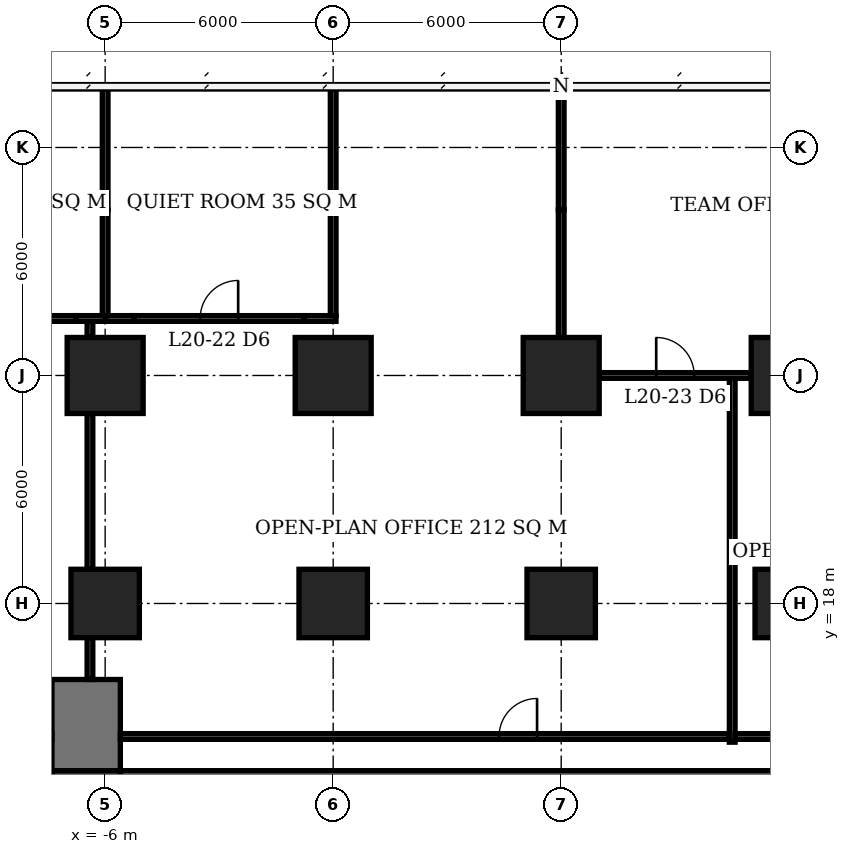
"""IFC4 building model, lengths in metres.
Left out: names, types, materials, properties, quantities, classifications, styles, units other than length and angle.
Written with IfcOpenShell. Run it as: python <this file> out.ifc"""

import sys

from ifc_helpers import new_model, si_unit, direction, frame, frame_2d, origin, origin_2d, place, context, subcontext, project, spatial, rectangle, extrude, element, fill, save


model = new_model("IFC4")
c1 = context("Model", 3, precision=1e-05, world=origin(), true_north=direction((0.0, 1.0)))
c2 = subcontext(c1, "Body", "Model", "MODEL_VIEW")
j1 = project(units=[si_unit("LENGTHUNIT", "METRE"), si_unit("PLANEANGLEUNIT", "RADIAN")], contexts=[c1])
p1 = place(None, origin())
s1 = spatial("IfcSite", under=j1, at=p1, CompositionType="ELEMENT")
p2 = place(p1, origin())
s2 = spatial("IfcBuilding", under=s1, at=p2, CompositionType="ELEMENT")
p3 = place(p2, frame((0.0, 0.0, 84.5)))
s3 = spatial("IfcBuildingStorey", under=s2, at=p3, CompositionType="ELEMENT", Elevation=84.5)
p4 = place(p3, frame((-6.0, 18.0, 0.0), z_axis=(0.0, 0.0, 1.0), x_axis=(1.0, 0.0, 0.0)))
e1 = element("IfcColumn", 1, at=p4, inside=s3, PredefinedType="COLUMN", context=c2, shape_type="SweptSolid", body=[
    extrude(rectangle(XDim=1.8, YDim=1.8, at=origin_2d()), origin(), (0.0, 0.0, 1.0), 3.9),
])
p5 = place(p3, frame((-6.0, 24.0, 0.0), z_axis=(0.0, 0.0, 1.0), x_axis=(1.0, 0.0, 0.0)))
e2 = element("IfcColumn", 2, at=p5, inside=s3, PredefinedType="COLUMN", context=c2, shape_type="SweptSolid", body=[
    extrude(rectangle(XDim=2.0, YDim=2.0, at=origin_2d()), origin(), (0.0, 0.0, 1.0), 3.9),
])
p6 = place(p3, frame((0.0, 18.0, 0.0), z_axis=(0.0, 0.0, 1.0), x_axis=(1.0, 0.0, 0.0)))
e3 = element("IfcColumn", 3, at=p6, inside=s3, PredefinedType="COLUMN", context=c2, shape_type="SweptSolid", body=[
    extrude(rectangle(XDim=1.8, YDim=1.8, at=origin_2d()), origin(), (0.0, 0.0, 1.0), 3.9),
])
p7 = place(p3, frame((0.0, 24.0, 0.0), z_axis=(0.0, 0.0, 1.0), x_axis=(1.0, 0.0, 0.0)))
e4 = element("IfcColumn", 4, at=p7, inside=s3, PredefinedType="COLUMN", context=c2, shape_type="SweptSolid", body=[
    extrude(rectangle(XDim=2.0, YDim=2.0, at=origin_2d()), origin(), (0.0, 0.0, 1.0), 3.9),
])
p8 = place(p3, frame((6.0, 18.0, 0.0), z_axis=(0.0, 0.0, 1.0), x_axis=(1.0, 0.0, 0.0)))
e5 = element("IfcColumn", 5, at=p8, inside=s3, PredefinedType="COLUMN", context=c2, shape_type="SweptSolid", body=[
    extrude(rectangle(XDim=1.8, YDim=1.8, at=origin_2d()), origin(), (0.0, 0.0, 1.0), 3.9),
])
p9 = place(p3, frame((6.0, 24.0, 0.0), z_axis=(0.0, 0.0, 1.0), x_axis=(1.0, 0.0, 0.0)))
e6 = element("IfcColumn", 6, at=p9, inside=s3, PredefinedType="COLUMN", context=c2, shape_type="SweptSolid", body=[
    extrude(rectangle(XDim=2.0, YDim=2.0, at=origin_2d()), origin(), (0.0, 0.0, 1.0), 3.9),
])
p10 = place(p3, frame((12.0, 18.0, 0.0), z_axis=(0.0, 0.0, 1.0), x_axis=(1.0, 0.0, 0.0)))
e7 = element("IfcColumn", 7, at=p10, inside=s3, PredefinedType="COLUMN", context=c2, shape_type="SweptSolid", body=[
    extrude(rectangle(XDim=1.8, YDim=1.8, at=origin_2d()), origin(), (0.0, 0.0, 1.0), 3.9),
])
p11 = place(p3, frame((12.0, 24.0, 0.0), z_axis=(0.0, 0.0, 1.0), x_axis=(1.0, 0.0, 0.0)))
e8 = element("IfcColumn", 8, at=p11, inside=s3, PredefinedType="COLUMN", context=c2, shape_type="SweptSolid", body=[
    extrude(rectangle(XDim=2.0, YDim=2.0, at=origin_2d()), origin(), (0.0, 0.0, 1.0), 3.9),
])
p12 = place(p3, frame((-5.6, 12.6, 0.0), z_axis=(0.0, 0.0, 1.0), x_axis=(1.0, 0.0, 0.0)))
e9 = element("IfcWall", 9, at=p12, inside=s3, PredefinedType="SHEAR", context=c2, shape_type="SweptSolid", body=[
    extrude(rectangle(XDim=23.2, YDim=2.0, at=frame_2d((11.6, 0.0))), origin(), (0.0, 0.0, 1.0), 3.9),
])
p13 = place(p3, frame((-6.5, -7.6, 0.0), z_axis=(0.0, 0.0, 1.0), x_axis=(0.0, 1.0, 0.0)))
e10 = element("IfcWall", 10, at=p13, inside=s3, PredefinedType="SHEAR", context=c2, shape_type="SweptSolid", body=[
    extrude(rectangle(XDim=21.2, YDim=1.8, at=frame_2d((10.6, 0.0))), origin(), (0.0, 0.0, 1.0), 3.9),
])
p14 = place(p13, frame((7.8, 0.0, 0.0)))
e11 = element("IfcOpeningElement", 11, at=p14, cuts=e10, PredefinedType="OPENING", context=c2, shape_type="SweptSolid", body=[
    extrude(rectangle(XDim=1.8, YDim=2.4, at=frame_2d((0.9, 1.2))), frame((0.0, 0.91, 0.0), z_axis=(0.0, -1.0, 0.0), x_axis=(1.0, 0.0, 0.0)), (0.0, 0.0, 1.0), 1.82),
])
p15 = place(p3, frame((-6.5, 13.6, 0.0), z_axis=(0.0, 0.0, 1.0), x_axis=(0.0, 1.0, 0.0)))
e12 = element("IfcWall", 12, at=p15, inside=s3, PredefinedType="SHEAR", context=c2, shape_type="SweptSolid", body=[
    extrude(rectangle(XDim=2.4, YDim=1.8, at=frame_2d((1.2, 0.0))), origin(), (0.0, 0.0, 1.0), 3.9),
])
p16 = place(p3, frame((7.0, 24.0, 0.0), z_axis=(0.0, 0.0, 1.0), x_axis=(1.0, 0.0, 0.0)))
e13 = element("IfcWall", 13, at=p16, inside=s3, PredefinedType="PARTITIONING", context=c2, shape_type="SweptSolid", body=[
    extrude(rectangle(XDim=4.0, YDim=0.15, at=frame_2d((2.0, 0.0))), origin(), (0.0, 0.0, 1.0), 3.65),
])
p17 = place(p16, frame((1.5, 0.0, 0.0)))
e14 = element("IfcOpeningElement", 14, at=p17, cuts=e13, PredefinedType="OPENING", context=c2, shape_type="SweptSolid", body=[
    extrude(rectangle(XDim=1.0, YDim=2.1, at=frame_2d((0.5, 1.05))), frame((0.0, 0.085, 0.0), z_axis=(0.0, -1.0, 0.0), x_axis=(1.0, 0.0, 0.0)), (0.0, 0.0, 1.0), 0.17),
])
p18 = place(p3, frame((-10.79, 25.5, 0.0), z_axis=(0.0, 0.0, 1.0), x_axis=(1.0, 0.0, 0.0)))
e15 = element("IfcWall", 15, at=p18, inside=s3, PredefinedType="PARTITIONING", context=c2, shape_type="SweptSolid", body=[
    extrude(rectangle(XDim=4.03, YDim=0.15, at=frame_2d((2.015, 0.0))), origin(), (0.0, 0.0, 1.0), 3.65),
])
p19 = place(p18, frame((1.515, 0.0, 0.0)))
e16 = element("IfcOpeningElement", 16, at=p19, cuts=e15, PredefinedType="OPENING", context=c2, shape_type="SweptSolid", body=[
    extrude(rectangle(XDim=1.0, YDim=2.1, at=frame_2d((0.5, 1.05))), frame((0.0, 0.085, 0.0), z_axis=(0.0, -1.0, 0.0), x_axis=(1.0, 0.0, 0.0)), (0.0, 0.0, 1.0), 0.17),
])
p20 = place(p3, frame((-6.76, 25.5, 0.0), z_axis=(0.0, 0.0, 1.0), x_axis=(1.0, 0.0, 0.0)))
e17 = element("IfcWall", 17, at=p20, inside=s3, PredefinedType="PARTITIONING", context=c2, shape_type="SweptSolid", body=[
    extrude(rectangle(XDim=0.835, YDim=0.15, at=frame_2d((0.417, 0.0))), origin(), (0.0, 0.0, 1.0), 2.15),
])
p21 = place(p3, frame((-6.0, 25.5, 0.0), z_axis=(0.0, 0.0, 1.0), x_axis=(1.0, 0.0, 0.0)))
e18 = element("IfcWall", 18, at=p21, inside=s3, PredefinedType="PARTITIONING", context=c2, shape_type="SweptSolid", body=[
    extrude(rectangle(XDim=0.76, YDim=0.15, at=frame_2d((0.38, 0.0))), origin(), (0.0, 0.0, 1.0), 2.15),
])
p22 = place(p3, frame((-5.24, 25.5, 0.0), z_axis=(0.0, 0.0, 1.0), x_axis=(1.0, 0.0, 0.0)))
e19 = element("IfcWall", 19, at=p22, inside=s3, PredefinedType="PARTITIONING", context=c2, shape_type="SweptSolid", body=[
    extrude(rectangle(XDim=4.48, YDim=0.15, at=frame_2d((2.24, 0.0))), origin(), (0.0, 0.0, 1.0), 3.65),
])
p23 = place(p22, frame((1.74, 0.0, 0.0)))
e20 = element("IfcOpeningElement", 20, at=p23, cuts=e19, PredefinedType="OPENING", context=c2, shape_type="SweptSolid", body=[
    extrude(rectangle(XDim=1.0, YDim=2.1, at=frame_2d((0.5, 1.05))), frame((0.0, 0.085, 0.0), z_axis=(0.0, -1.0, 0.0), x_axis=(1.0, 0.0, 0.0)), (0.0, 0.0, 1.0), 0.17),
])
p24 = place(p3, frame((-0.76, 25.5, 0.0), z_axis=(0.0, 0.0, 1.0), x_axis=(1.0, 0.0, 0.0)))
e21 = element("IfcWall", 21, at=p24, inside=s3, PredefinedType="PARTITIONING", context=c2, shape_type="SweptSolid", body=[
    extrude(rectangle(XDim=0.835, YDim=0.15, at=frame_2d((0.417, 0.0))), origin(), (0.0, 0.0, 1.0), 2.15),
])
p25 = place(p3, frame((-6.0, 25.575, 0.0), z_axis=(0.0, 0.0, 1.0), x_axis=(0.0, 1.0, 0.0)))
e22 = element("IfcWall", 22, at=p25, inside=s3, PredefinedType="PARTITIONING", context=c2, shape_type="SweptSolid", body=[
    extrude(rectangle(XDim=2.785, YDim=0.15, at=frame_2d((1.393, 0.0))), origin(), (0.0, 0.0, 1.0), 2.15),
])
p26 = place(p3, frame((-6.0, 28.36, 0.0), z_axis=(0.0, 0.0, 1.0), x_axis=(0.0, 1.0, 0.0)))
e23 = element("IfcWall", 23, at=p26, inside=s3, PredefinedType="PARTITIONING", context=c2, shape_type="SweptSolid", body=[
    extrude(rectangle(XDim=3.24, YDim=0.15, at=frame_2d((1.62, 0.0))), origin(), (0.0, 0.0, 1.0), 3.65),
])
p27 = place(p3, frame((0.0, 25.575, 0.0), z_axis=(0.0, 0.0, 1.0), x_axis=(0.0, 1.0, 0.0)))
e24 = element("IfcWall", 24, at=p27, inside=s3, PredefinedType="PARTITIONING", context=c2, shape_type="SweptSolid", body=[
    extrude(rectangle(XDim=2.785, YDim=0.15, at=frame_2d((1.393, 0.0))), origin(), (0.0, 0.0, 1.0), 2.15),
])
p28 = place(p3, frame((0.0, 28.36, 0.0), z_axis=(0.0, 0.0, 1.0), x_axis=(0.0, 1.0, 0.0)))
e25 = element("IfcWall", 25, at=p28, inside=s3, PredefinedType="PARTITIONING", context=c2, shape_type="SweptSolid", body=[
    extrude(rectangle(XDim=3.24, YDim=0.15, at=frame_2d((1.62, 0.0))), origin(), (0.0, 0.0, 1.0), 3.65),
])
p29 = place(p3, frame((6.0, 25.0, 0.0), z_axis=(0.0, 0.0, 1.0), x_axis=(0.0, 1.0, 0.0)))
e26 = element("IfcWall", 26, at=p29, inside=s3, PredefinedType="PARTITIONING", context=c2, shape_type="SweptSolid", body=[
    extrude(rectangle(XDim=3.36, YDim=0.15, at=frame_2d((1.68, 0.0))), origin(), (0.0, 0.0, 1.0), 2.15),
])
p30 = place(p3, frame((6.0, 28.36, 0.0), z_axis=(0.0, 0.0, 1.0), x_axis=(0.0, 1.0, 0.0)))
e27 = element("IfcWall", 27, at=p30, inside=s3, PredefinedType="PARTITIONING", context=c2, shape_type="SweptSolid", body=[
    extrude(rectangle(XDim=3.19, YDim=0.15, at=frame_2d((1.595, 0.0))), origin(), (0.0, 0.0, 1.0), 3.65),
])
p31 = place(p3, frame((-6.4, 16.0, 0.0), z_axis=(0.0, 0.0, 1.0), x_axis=(0.0, 1.0, 0.0)))
e28 = element("IfcWall", 28, at=p31, inside=s3, PredefinedType="PARTITIONING", context=c2, shape_type="SweptSolid", body=[
    extrude(rectangle(XDim=1.1, YDim=0.15, at=frame_2d((0.55, 0.0))), origin(), (0.0, 0.0, 1.0), 3.65),
])
p32 = place(p3, frame((-6.4, 18.9, 0.0), z_axis=(0.0, 0.0, 1.0), x_axis=(0.0, 1.0, 0.0)))
e29 = element("IfcWall", 29, at=p32, inside=s3, PredefinedType="PARTITIONING", context=c2, shape_type="SweptSolid", body=[
    extrude(rectangle(XDim=4.1, YDim=0.15, at=frame_2d((2.05, 0.0))), origin(), (0.0, 0.0, 1.0), 3.65),
])
p33 = place(p3, frame((-6.4, 25.0, 0.0), z_axis=(0.0, 0.0, 1.0), x_axis=(0.0, 1.0, 0.0)))
e30 = element("IfcWall", 30, at=p33, inside=s3, PredefinedType="PARTITIONING", context=c2, shape_type="SweptSolid", body=[
    extrude(rectangle(XDim=0.425, YDim=0.15, at=frame_2d((0.212, 0.0))), origin(), (0.0, 0.0, 1.0), 2.15),
])
p34 = place(p3, frame((-5.6, 14.5, 0.0), z_axis=(0.0, 0.0, 1.0), x_axis=(1.0, 0.0, 0.0)))
e31 = element("IfcWall", 31, at=p34, inside=s3, PredefinedType="PARTITIONING", context=c2, shape_type="SweptSolid", body=[
    extrude(rectangle(XDim=16.025, YDim=0.15, at=frame_2d((8.013, 0.0))), origin(), (0.0, 0.0, 1.0), 3.65),
])
p35 = place(p34, frame((9.965, 0.0, 0.0)))
e32 = element("IfcOpeningElement", 32, at=p35, cuts=e31, PredefinedType="OPENING", context=c2, shape_type="SweptSolid", body=[
    extrude(rectangle(XDim=1.0, YDim=2.1, at=frame_2d((0.5, 1.05))), frame((0.0, 0.085, 0.0), z_axis=(0.0, -1.0, 0.0), x_axis=(1.0, 0.0, 0.0)), (0.0, 0.0, 1.0), 0.17),
])
p36 = place(p3, frame((10.5, 14.35, 0.0), z_axis=(0.0, 0.0, 1.0), x_axis=(0.0, 1.0, 0.0)))
e33 = element("IfcWall", 33, at=p36, inside=s3, PredefinedType="PARTITIONING", context=c2, shape_type="SweptSolid", body=[
    extrude(rectangle(XDim=9.575, YDim=0.15, at=frame_2d((4.788, 0.0))), origin(), (0.0, 0.0, 1.0), 3.65),
])
p37 = place(p3, frame((10.575, 14.5, 0.0), z_axis=(0.0, 0.0, 1.0), x_axis=(1.0, 0.0, 0.0)))
e34 = element("IfcWall", 34, at=p37, inside=s3, PredefinedType="PARTITIONING", context=c2, shape_type="SweptSolid", body=[
    extrude(rectangle(XDim=7.025, YDim=0.15, at=frame_2d((3.513, 0.0))), origin(), (0.0, 0.0, 1.0), 3.65),
])
p38 = place(p37, frame((4.04, 0.0, 0.0)))
e35 = element("IfcOpeningElement", 35, at=p38, cuts=e34, PredefinedType="OPENING", context=c2, shape_type="SweptSolid", body=[
    extrude(rectangle(XDim=1.0, YDim=2.1, at=frame_2d((0.5, 1.05))), frame((0.0, 0.085, 0.0), z_axis=(0.0, -1.0, 0.0), x_axis=(1.0, 0.0, 0.0)), (0.0, 0.0, 1.0), 0.17),
])
p39 = place(p23, origin())
e36 = element("IfcDoor", 36, at=p39, inside=s3, OperationType="SINGLE_SWING_RIGHT", PredefinedType="DOOR", context=c2, shape_type="SweptSolid", body=[
    extrude(rectangle(XDim=1.0, YDim=2.1, at=frame_2d((0.5, 1.05))), frame((0.0, 0.025, 0.0), z_axis=(0.0, -1.0, 0.0), x_axis=(1.0, 0.0, 0.0)), (0.0, 0.0, 1.0), 0.05),
])
fill(e20, e36)
p40 = place(p17, origin())
e37 = element("IfcDoor", 37, at=p40, inside=s3, OperationType="SINGLE_SWING_LEFT", PredefinedType="DOOR", context=c2, shape_type="SweptSolid", body=[
    extrude(rectangle(XDim=1.0, YDim=2.1, at=frame_2d((0.5, 1.05))), frame((0.0, 0.025, 0.0), z_axis=(0.0, -1.0, 0.0), x_axis=(1.0, 0.0, 0.0)), (0.0, 0.0, 1.0), 0.05),
])
fill(e14, e37)
p41 = place(p35, origin())
e38 = element("IfcDoor", 38, at=p41, inside=s3, OperationType="SINGLE_SWING_RIGHT", PredefinedType="DOOR", context=c2, shape_type="SweptSolid", body=[
    extrude(rectangle(XDim=1.0, YDim=2.1, at=frame_2d((0.5, 1.05))), frame((0.0, 0.025, 0.0), z_axis=(0.0, -1.0, 0.0), x_axis=(1.0, 0.0, 0.0)), (0.0, 0.0, 1.0), 0.05),
])
fill(e32, e38)
save(model, sys.argv[1])
